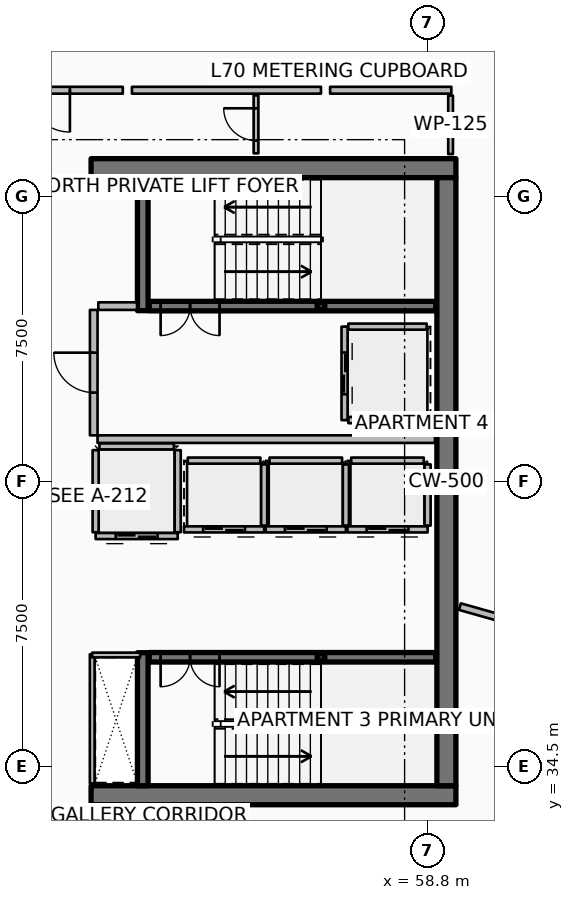
"""IFC4 building model, lengths in metres.
Left out: names, types, materials, properties, quantities, classifications, styles, units other than length and angle.
Written with IfcOpenShell. Run it as: python <this file> out.ifc"""

import sys

from ifc_helpers import new_model, si_unit, direction, frame, frame_2d, origin, origin_2d, place, context, subcontext, project, spatial, rectangle, hollow_rectangle, extrude, element, fill, save


model = new_model("IFC4")
c1 = context("Model", 3, precision=1e-05, world=origin(), true_north=direction((0.0, 1.0)))
c2 = subcontext(c1, "Body", "Model", "MODEL_VIEW")
j1 = project(units=[si_unit("LENGTHUNIT", "METRE"), si_unit("PLANEANGLEUNIT", "RADIAN")], contexts=[c1])
p1 = place(None, origin())
s1 = spatial("IfcSite", under=j1, at=p1, CompositionType="ELEMENT")
p2 = place(p1, origin())
s2 = spatial("IfcBuilding", under=s1, at=p2, CompositionType="ELEMENT")
p3 = place(p2, frame((0.0, 0.0, 279.05)))
s3 = spatial("IfcBuildingStorey", under=s2, at=p3, CompositionType="ELEMENT", Elevation=279.05)
for number, where, z_axis, x_axis in (
    (1, (49.95, 33.75, 0.0), (0.0, 0.0, 1.0), (1.0, 0.0, 0.0)),
    (2, (49.95, 50.25, 0.0), (0.0, 0.0, 1.0), (1.0, 0.0, 0.0)),
):
    element("IfcWall", number, at=place(p3, frame(where, z_axis=z_axis, x_axis=x_axis)), inside=s3, PredefinedType="SHEAR", context=c2, shape_type="SweptSolid", body=[
        extrude(rectangle(XDim=9.6, YDim=0.5, at=frame_2d((4.8, 0.0))), origin(), (0.0, 0.0, 1.0), 3.85),
    ])
p4 = place(p3, frame((59.3, 34.0, 0.0), z_axis=(0.0, 0.0, 1.0), x_axis=(0.0, 1.0, 0.0)))
e3 = element("IfcWall", 3, at=p4, inside=s3, PredefinedType="SHEAR", context=c2, shape_type="SweptSolid", body=[
    extrude(rectangle(XDim=16.0, YDim=0.5, at=frame_2d((8.0, 0.0))), origin(), (0.0, 0.0, 1.0), 3.85),
])
for number, where, z_axis, x_axis in (
    (4, (51.31, 46.5, 0.0), (0.0, 0.0, 1.0), (0.0, 1.0, 0.0)),
    (5, (51.31, 34.0, 0.0), (0.0, 0.0, 1.0), (0.0, 1.0, 0.0)),
):
    element("IfcWall", number, at=place(p3, frame(where, z_axis=z_axis, x_axis=x_axis)), inside=s3, PredefinedType="SHEAR", context=c2, shape_type="SweptSolid", body=[
        extrude(rectangle(XDim=3.5, YDim=0.28, at=frame_2d((1.75, 0.0))), origin(), (0.0, 0.0, 1.0), 3.85),
    ])
for number, where, z_axis, x_axis in (
    (6, (56.0, 46.62, 0.0), (0.0, 0.0, 1.0), (1.0, 0.0, 0.0)),
    (7, (56.0, 37.38, 0.0), (0.0, 0.0, 1.0), (1.0, 0.0, 0.0)),
):
    element("IfcColumn", number, at=place(p3, frame(where, z_axis=z_axis, x_axis=x_axis)), inside=s3, PredefinedType="COLUMN", context=c2, shape_type="SweptSolid", body=[
        extrude(hollow_rectangle(XDim=0.2, YDim=0.2, WallThickness=0.01, InnerFilletRadius=0.01, OuterFilletRadius=0.02, at=origin_2d()), origin(), (0.0, 0.0, 1.0), 1.72),
    ])
p5 = place(p3, frame((51.48, 46.62, 0.0), z_axis=(0.0, 0.0, 1.0), x_axis=(1.0, 0.0, 0.0)))
e8 = element("IfcWall", 8, at=p5, inside=s3, PredefinedType="SOLIDWALL", context=c2, shape_type="SweptSolid", body=[
    extrude(rectangle(XDim=7.54, YDim=0.25, at=frame_2d((3.77, 0.0))), origin(), (0.0, 0.0, 1.0), 3.59),
])
p6 = place(p5, frame((0.3, 0.0, 0.0)))
e9 = element("IfcOpeningElement", 9, at=p6, cuts=e8, PredefinedType="OPENING", context=c2, shape_type="SweptSolid", body=[
    extrude(rectangle(XDim=1.55, YDim=2.15, at=frame_2d((0.775, 1.075))), frame((0.0, 0.135, 0.0), z_axis=(0.0, -1.0, 0.0), x_axis=(1.0, 0.0, 0.0)), (0.0, 0.0, 1.0), 0.27),
])
p7 = place(p3, frame((51.48, 37.38, 0.0), z_axis=(0.0, 0.0, 1.0), x_axis=(1.0, 0.0, 0.0)))
e10 = element("IfcWall", 10, at=p7, inside=s3, PredefinedType="SOLIDWALL", context=c2, shape_type="SweptSolid", body=[
    extrude(rectangle(XDim=7.54, YDim=0.25, at=frame_2d((3.77, 0.0))), origin(), (0.0, 0.0, 1.0), 3.59),
])
p8 = place(p7, frame((0.3, 0.0, 0.0)))
e11 = element("IfcOpeningElement", 11, at=p8, cuts=e10, PredefinedType="OPENING", context=c2, shape_type="SweptSolid", body=[
    extrude(rectangle(XDim=1.55, YDim=2.15, at=frame_2d((0.775, 1.075))), frame((0.0, 0.135, 0.0), z_axis=(0.0, -1.0, 0.0), x_axis=(1.0, 0.0, 0.0)), (0.0, 0.0, 1.0), 0.27),
])
p9 = place(p3, frame((54.505, 40.745, 0.0), z_axis=(0.0, 0.0, 1.0), x_axis=(-1.0, 0.0, 0.0)))
e12 = element("IfcWall", 12, at=p9, inside=s3, PredefinedType="PARTITIONING", context=c2, shape_type="SweptSolid", body=[
    extrude(rectangle(XDim=2.11, YDim=0.16, at=frame_2d((1.055, 0.0))), origin(), (0.0, 0.0, 1.0), 3.59),
])
p10 = place(p9, frame((0.505, 0.0, 0.0)))
e13 = element("IfcOpeningElement", 13, at=p10, cuts=e12, PredefinedType="OPENING", context=c2, shape_type="SweptSolid", body=[
    extrude(rectangle(XDim=1.1, YDim=2.1, at=frame_2d((0.55, 1.05))), frame((0.0, 0.09, 0.0), z_axis=(0.0, -1.0, 0.0), x_axis=(1.0, 0.0, 0.0)), (0.0, 0.0, 1.0), 0.18),
])
p11 = place(p3, frame((54.505, 40.845, 0.0), z_axis=(0.0, 0.0, 1.0), x_axis=(0.0, 1.0, 0.0)))
e14 = element("IfcWall", 14, at=p11, inside=s3, PredefinedType="PARTITIONING", context=c2, shape_type="SweptSolid", body=[
    extrude(rectangle(XDim=1.61, YDim=0.16, at=frame_2d((0.805, 0.0))), origin(), (0.0, 0.0, 1.0), 3.59),
])
p12 = place(p3, frame((52.495, 42.555, 0.0), z_axis=(0.0, 0.0, 1.0), x_axis=(1.0, 0.0, 0.0)))
e15 = element("IfcWall", 15, at=p12, inside=s3, PredefinedType="PARTITIONING", context=c2, shape_type="SweptSolid", body=[
    extrude(rectangle(XDim=1.91, YDim=0.16, at=frame_2d((0.955, 0.0))), origin(), (0.0, 0.0, 1.0), 3.59),
])
p13 = place(p3, frame((56.655, 40.745, 0.0), z_axis=(0.0, 0.0, 1.0), x_axis=(-1.0, 0.0, 0.0)))
e16 = element("IfcWall", 16, at=p13, inside=s3, PredefinedType="PARTITIONING", context=c2, shape_type="SweptSolid", body=[
    extrude(rectangle(XDim=2.11, YDim=0.16, at=frame_2d((1.055, 0.0))), origin(), (0.0, 0.0, 1.0), 3.59),
])
p14 = place(p13, frame((0.505, 0.0, 0.0)))
e17 = element("IfcOpeningElement", 17, at=p14, cuts=e16, PredefinedType="OPENING", context=c2, shape_type="SweptSolid", body=[
    extrude(rectangle(XDim=1.1, YDim=2.1, at=frame_2d((0.55, 1.05))), frame((0.0, 0.09, 0.0), z_axis=(0.0, -1.0, 0.0), x_axis=(1.0, 0.0, 0.0)), (0.0, 0.0, 1.0), 0.18),
])
p15 = place(p3, frame((56.655, 40.845, 0.0), z_axis=(0.0, 0.0, 1.0), x_axis=(0.0, 1.0, 0.0)))
e18 = element("IfcWall", 18, at=p15, inside=s3, PredefinedType="PARTITIONING", context=c2, shape_type="SweptSolid", body=[
    extrude(rectangle(XDim=1.61, YDim=0.16, at=frame_2d((0.805, 0.0))), origin(), (0.0, 0.0, 1.0), 3.59),
])
p16 = place(p3, frame((54.645, 42.555, 0.0), z_axis=(0.0, 0.0, 1.0), x_axis=(1.0, 0.0, 0.0)))
e19 = element("IfcWall", 19, at=p16, inside=s3, PredefinedType="PARTITIONING", context=c2, shape_type="SweptSolid", body=[
    extrude(rectangle(XDim=1.91, YDim=0.16, at=frame_2d((0.955, 0.0))), origin(), (0.0, 0.0, 1.0), 3.59),
])
p17 = place(p3, frame((58.805, 40.745, 0.0), z_axis=(0.0, 0.0, 1.0), x_axis=(-1.0, 0.0, 0.0)))
e20 = element("IfcWall", 20, at=p17, inside=s3, PredefinedType="PARTITIONING", context=c2, shape_type="SweptSolid", body=[
    extrude(rectangle(XDim=2.11, YDim=0.16, at=frame_2d((1.055, 0.0))), origin(), (0.0, 0.0, 1.0), 3.59),
])
p18 = place(p17, frame((0.505, 0.0, 0.0)))
e21 = element("IfcOpeningElement", 21, at=p18, cuts=e20, PredefinedType="OPENING", context=c2, shape_type="SweptSolid", body=[
    extrude(rectangle(XDim=1.1, YDim=2.1, at=frame_2d((0.55, 1.05))), frame((0.0, 0.09, 0.0), z_axis=(0.0, -1.0, 0.0), x_axis=(1.0, 0.0, 0.0)), (0.0, 0.0, 1.0), 0.18),
])
p19 = place(p3, frame((58.805, 40.845, 0.0), z_axis=(0.0, 0.0, 1.0), x_axis=(0.0, 1.0, 0.0)))
e22 = element("IfcWall", 22, at=p19, inside=s3, PredefinedType="PARTITIONING", context=c2, shape_type="SweptSolid", body=[
    extrude(rectangle(XDim=1.61, YDim=0.16, at=frame_2d((0.805, 0.0))), origin(), (0.0, 0.0, 1.0), 3.59),
])
p20 = place(p3, frame((56.795, 42.555, 0.0), z_axis=(0.0, 0.0, 1.0), x_axis=(1.0, 0.0, 0.0)))
e23 = element("IfcWall", 23, at=p20, inside=s3, PredefinedType="PARTITIONING", context=c2, shape_type="SweptSolid", body=[
    extrude(rectangle(XDim=1.91, YDim=0.16, at=frame_2d((0.955, 0.0))), origin(), (0.0, 0.0, 1.0), 3.59),
])
p21 = place(p3, frame((56.62, 46.08, 0.0), z_axis=(0.0, 0.0, 1.0), x_axis=(0.0, -1.0, 0.0)))
e24 = element("IfcWall", 24, at=p21, inside=s3, PredefinedType="PARTITIONING", context=c2, shape_type="SweptSolid", body=[
    extrude(rectangle(XDim=2.46, YDim=0.16, at=frame_2d((1.23, 0.0))), origin(), (0.0, 0.0, 1.0), 3.59),
])
p22 = place(p21, frame((0.68, 0.0, 0.0)))
e25 = element("IfcOpeningElement", 25, at=p22, cuts=e24, PredefinedType="OPENING", context=c2, shape_type="SweptSolid", body=[
    extrude(rectangle(XDim=1.1, YDim=2.1, at=frame_2d((0.55, 1.05))), frame((0.0, 0.09, 0.0), z_axis=(0.0, -1.0, 0.0), x_axis=(1.0, 0.0, 0.0)), (0.0, 0.0, 1.0), 0.18),
])
for number, where, z_axis, x_axis in (
    (26, (56.72, 46.08, 0.0), (0.0, 0.0, 1.0), (1.0, 0.0, 0.0)),
    (27, (56.72, 43.62, 0.0), (0.0, 0.0, 1.0), (1.0, 0.0, 0.0)),
):
    element("IfcWall", number, at=place(p3, frame(where, z_axis=z_axis, x_axis=x_axis)), inside=s3, PredefinedType="PARTITIONING", context=c2, shape_type="SweptSolid", body=[
        extrude(rectangle(XDim=2.06, YDim=0.16, at=frame_2d((1.03, 0.0))), origin(), (0.0, 0.0, 1.0), 3.59),
    ])
p23 = place(p3, frame((52.23, 40.57, 0.0), z_axis=(0.0, 0.0, 1.0), x_axis=(-1.0, 0.0, 0.0)))
e28 = element("IfcWall", 28, at=p23, inside=s3, PredefinedType="PARTITIONING", context=c2, shape_type="SweptSolid", body=[
    extrude(rectangle(XDim=2.16, YDim=0.16, at=frame_2d((1.08, 0.0))), origin(), (0.0, 0.0, 1.0), 3.59),
])
p24 = place(p23, frame((0.53, 0.0, 0.0)))
e29 = element("IfcOpeningElement", 29, at=p24, cuts=e28, PredefinedType="OPENING", context=c2, shape_type="SweptSolid", body=[
    extrude(rectangle(XDim=1.1, YDim=2.1, at=frame_2d((0.55, 1.05))), frame((0.0, 0.09, 0.0), z_axis=(0.0, -1.0, 0.0), x_axis=(1.0, 0.0, 0.0)), (0.0, 0.0, 1.0), 0.18),
])
for number, where, z_axis, x_axis in (
    (30, (52.23, 40.67, 0.0), (0.0, 0.0, 1.0), (0.0, 1.0, 0.0)),
    (31, (50.07, 40.67, 0.0), (0.0, 0.0, 1.0), (0.0, 1.0, 0.0)),
):
    element("IfcWall", number, at=place(p3, frame(where, z_axis=z_axis, x_axis=x_axis)), inside=s3, PredefinedType="PARTITIONING", context=c2, shape_type="SweptSolid", body=[
        extrude(rectangle(XDim=2.16, YDim=0.16, at=frame_2d((1.08, 0.0))), origin(), (0.0, 0.0, 1.0), 3.59),
    ])
p25 = place(p3, frame((50.17, 42.93, 0.0), z_axis=(0.0, 0.0, 1.0), x_axis=(1.0, 0.0, 0.0)))
e32 = element("IfcWall", 32, at=p25, inside=s3, PredefinedType="PARTITIONING", context=c2, shape_type="SweptSolid", body=[
    extrude(rectangle(XDim=1.96, YDim=0.16, at=frame_2d((0.98, 0.0))), origin(), (0.0, 0.0, 1.0), 3.59),
])
p26 = place(p3, frame((50.12, 43.12, 0.0), z_axis=(0.0, 0.0, 1.0), x_axis=(1.0, 0.0, 0.0)))
e33 = element("IfcWall", 33, at=p26, inside=s3, PredefinedType="PARTITIONING", context=c2, shape_type="SweptSolid", body=[
    extrude(rectangle(XDim=8.88, YDim=0.2, at=frame_2d((4.44, 0.0))), origin(), (0.0, 0.0, 1.0), 3.59),
])
p27 = place(p3, frame((50.14, 46.62, 0.0), z_axis=(0.0, 0.0, 1.0), x_axis=(1.0, 0.0, 0.0)))
e34 = element("IfcWall", 34, at=p27, inside=s3, PredefinedType="PARTITIONING", context=c2, shape_type="SweptSolid", body=[
    extrude(rectangle(XDim=1.02, YDim=0.2, at=frame_2d((0.51, 0.0))), origin(), (0.0, 0.0, 1.0), 3.59),
])
p28 = place(p3, frame((50.02, 43.22, 0.0), z_axis=(0.0, 0.0, 1.0), x_axis=(0.0, 1.0, 0.0)))
e35 = element("IfcWall", 35, at=p28, inside=s3, PredefinedType="PARTITIONING", context=c2, shape_type="SweptSolid", body=[
    extrude(rectangle(XDim=3.3, YDim=0.2, at=frame_2d((1.65, 0.0))), origin(), (0.0, 0.0, 1.0), 3.59),
])
p29 = place(p28, frame((1.125, 0.0, 0.0)))
e36 = element("IfcOpeningElement", 36, at=p29, cuts=e35, PredefinedType="OPENING", context=c2, shape_type="SweptSolid", body=[
    extrude(rectangle(XDim=1.05, YDim=2.1, at=frame_2d((0.525, 1.05))), frame((0.0, 0.11, 0.0), z_axis=(0.0, -1.0, 0.0), x_axis=(1.0, 0.0, 0.0)), (0.0, 0.0, 1.0), 0.22),
])
p30 = place(p3, frame((49.98, 34.06, 0.0), z_axis=(0.0, 0.0, 1.0), x_axis=(0.0, 1.0, 0.0)))
e37 = element("IfcWall", 37, at=p30, inside=s3, PredefinedType="PARTITIONING", context=c2, shape_type="SweptSolid", body=[
    extrude(rectangle(XDim=3.4, YDim=0.125, at=frame_2d((1.7, 0.0))), origin(), (0.0, 0.0, 1.0), 3.03),
])
p31 = place(p3, frame((49.98, 37.44, 0.0), z_axis=(0.0, 0.0, 1.0), x_axis=(1.0, 0.0, 0.0)))
e38 = element("IfcWall", 38, at=p31, inside=s3, PredefinedType="PARTITIONING", context=c2, shape_type="SweptSolid", body=[
    extrude(rectangle(XDim=1.26, YDim=0.125, at=frame_2d((0.63, 0.0))), origin(), (0.0, 0.0, 1.0), 3.03),
])
p32 = place(p3, frame((59.41, 50.62, 0.0), z_axis=(0.0, 0.0, 1.0), x_axis=(0.0, 1.0, 0.0)))
e39 = element("IfcWall", 39, at=p32, inside=s3, PredefinedType="PARTITIONING", context=c2, shape_type="SweptSolid", body=[
    extrude(rectangle(XDim=1.54, YDim=0.125, at=frame_2d((0.77, 0.0))), origin(), (0.0, 0.0, 1.0), 3.03),
])
p33 = place(p3, frame((54.29, 50.64, 0.0), z_axis=(0.0, 0.0, 1.0), x_axis=(0.0, 1.0, 0.0)))
e40 = element("IfcWall", 40, at=p33, inside=s3, PredefinedType="PARTITIONING", context=c2, shape_type="SweptSolid", body=[
    extrude(rectangle(XDim=1.52, YDim=0.125, at=frame_2d((0.76, 0.0))), origin(), (0.0, 0.0, 1.0), 3.03),
])
p34 = place(p33, frame((0.335, 0.0, 0.0)))
e41 = element("IfcOpeningElement", 41, at=p34, cuts=e40, PredefinedType="OPENING", context=c2, shape_type="SweptSolid", body=[
    extrude(rectangle(XDim=0.85, YDim=2.06, at=frame_2d((0.425, 1.03))), frame((0.0, 0.073, 0.0), z_axis=(0.0, -1.0, 0.0), x_axis=(1.0, 0.0, 0.0)), (0.0, 0.0, 1.0), 0.145),
])
p35 = place(p3, frame((59.656, 38.713, 0.0), z_axis=(0.0, 0.0, 1.0), x_axis=(0.962454756022, -0.27144215334, 0.0)))
e42 = element("IfcWall", 42, at=p35, inside=s3, PredefinedType="PARTITIONING", context=c2, shape_type="SweptSolid", body=[
    extrude(rectangle(XDim=17.385, YDim=0.18, at=frame_2d((8.692, 0.0))), origin(), (0.0, 0.0, 1.0), 2.957),
])
p36 = place(p3, frame((50.785, 52.3, 0.0), z_axis=(0.0, 0.0, 1.0), x_axis=(-1.0, 0.0, 0.0)))
e43 = element("IfcWall", 43, at=p36, inside=s3, PredefinedType="PARTITIONING", context=c2, shape_type="SweptSolid", body=[
    extrude(rectangle(XDim=3.884, YDim=0.18, at=frame_2d((1.942, 0.0))), origin(), (0.0, 0.0, 1.0), 2.957),
])
p37 = place(p36, frame((1.392, 0.0, 0.0)))
e44 = element("IfcOpeningElement", 44, at=p37, cuts=e43, PredefinedType="OPENING", context=c2, shape_type="SweptSolid", body=[
    extrude(rectangle(XDim=1.1, YDim=2.1, at=frame_2d((0.55, 1.05))), frame((0.0, 0.1, 0.0), z_axis=(0.0, -1.0, 0.0), x_axis=(1.0, 0.0, 0.0)), (0.0, 0.0, 1.0), 0.2),
])
p38 = place(p3, frame((59.43, 52.3, 0.0), z_axis=(0.0, 0.0, 1.0), x_axis=(-1.0, 0.0, 0.0)))
e45 = element("IfcWall", 45, at=p38, inside=s3, PredefinedType="PARTITIONING", context=c2, shape_type="SweptSolid", body=[
    extrude(rectangle(XDim=3.19, YDim=0.18, at=frame_2d((1.595, 0.0))), origin(), (0.0, 0.0, 1.0), 2.957),
])
p39 = place(p3, frame((56.0, 52.3, 0.0), z_axis=(0.0, 0.0, 1.0), x_axis=(-1.0, 0.0, 0.0)))
e46 = element("IfcWall", 46, at=p39, inside=s3, PredefinedType="PARTITIONING", context=c2, shape_type="SweptSolid", body=[
    extrude(rectangle(XDim=4.975, YDim=0.18, at=frame_2d((2.488, 0.0))), origin(), (0.0, 0.0, 1.0), 2.957),
])
p40 = place(p6, origin())
e47 = element("IfcDoor", 47, at=p40, inside=s3, OperationType="DOUBLE_DOOR_SINGLE_SWING", PredefinedType="DOOR", context=c2, shape_type="SweptSolid", body=[
    extrude(rectangle(XDim=1.55, YDim=2.15, at=frame_2d((0.775, 1.075))), frame((0.0, 0.025, 0.0), z_axis=(0.0, -1.0, 0.0), x_axis=(1.0, 0.0, 0.0)), (0.0, 0.0, 1.0), 0.05),
])
fill(e9, e47)
p41 = place(p8, origin())
e48 = element("IfcDoor", 48, at=p41, inside=s3, OperationType="DOUBLE_DOOR_SINGLE_SWING", PredefinedType="DOOR", context=c2, shape_type="SweptSolid", body=[
    extrude(rectangle(XDim=1.55, YDim=2.15, at=frame_2d((0.775, 1.075))), frame((0.0, 0.025, 0.0), z_axis=(0.0, -1.0, 0.0), x_axis=(1.0, 0.0, 0.0)), (0.0, 0.0, 1.0), 0.05),
])
fill(e11, e48)
p42 = place(p10, origin())
e49 = element("IfcDoor", 49, at=p42, inside=s3, OperationType="DOUBLE_DOOR_SLIDING", PredefinedType="DOOR", context=c2, shape_type="SweptSolid", body=[
    extrude(rectangle(XDim=1.1, YDim=2.1, at=frame_2d((0.55, 1.05))), frame((0.0, 0.025, 0.0), z_axis=(0.0, -1.0, 0.0), x_axis=(1.0, 0.0, 0.0)), (0.0, 0.0, 1.0), 0.05),
])
fill(e13, e49)
p43 = place(p14, origin())
e50 = element("IfcDoor", 50, at=p43, inside=s3, OperationType="DOUBLE_DOOR_SLIDING", PredefinedType="DOOR", context=c2, shape_type="SweptSolid", body=[
    extrude(rectangle(XDim=1.1, YDim=2.1, at=frame_2d((0.55, 1.05))), frame((0.0, 0.025, 0.0), z_axis=(0.0, -1.0, 0.0), x_axis=(1.0, 0.0, 0.0)), (0.0, 0.0, 1.0), 0.05),
])
fill(e17, e50)
p44 = place(p18, origin())
e51 = element("IfcDoor", 51, at=p44, inside=s3, OperationType="DOUBLE_DOOR_SLIDING", PredefinedType="DOOR", context=c2, shape_type="SweptSolid", body=[
    extrude(rectangle(XDim=1.1, YDim=2.1, at=frame_2d((0.55, 1.05))), frame((0.0, 0.025, 0.0), z_axis=(0.0, -1.0, 0.0), x_axis=(1.0, 0.0, 0.0)), (0.0, 0.0, 1.0), 0.05),
])
fill(e21, e51)
p45 = place(p22, origin())
e52 = element("IfcDoor", 52, at=p45, inside=s3, OperationType="DOUBLE_DOOR_SLIDING", PredefinedType="DOOR", context=c2, shape_type="SweptSolid", body=[
    extrude(rectangle(XDim=1.1, YDim=2.1, at=frame_2d((0.55, 1.05))), frame((0.0, 0.025, 0.0), z_axis=(0.0, -1.0, 0.0), x_axis=(1.0, 0.0, 0.0)), (0.0, 0.0, 1.0), 0.05),
])
fill(e25, e52)
p46 = place(p24, origin())
e53 = element("IfcDoor", 53, at=p46, inside=s3, OperationType="DOUBLE_DOOR_SLIDING", PredefinedType="DOOR", context=c2, shape_type="SweptSolid", body=[
    extrude(rectangle(XDim=1.1, YDim=2.1, at=frame_2d((0.55, 1.05))), frame((0.0, 0.025, 0.0), z_axis=(0.0, -1.0, 0.0), x_axis=(1.0, 0.0, 0.0)), (0.0, 0.0, 1.0), 0.05),
])
fill(e29, e53)
p47 = place(p29, origin())
e54 = element("IfcDoor", 54, at=p47, inside=s3, OperationType="SINGLE_SWING_RIGHT", PredefinedType="DOOR", context=c2, shape_type="SweptSolid", body=[
    extrude(rectangle(XDim=1.05, YDim=2.1, at=frame_2d((0.525, 1.05))), frame((0.0, 0.025, 0.0), z_axis=(0.0, -1.0, 0.0), x_axis=(1.0, 0.0, 0.0)), (0.0, 0.0, 1.0), 0.05),
])
fill(e36, e54)
p48 = place(p34, origin())
e55 = element("IfcDoor", 55, at=p48, inside=s3, OperationType="SINGLE_SWING_RIGHT", PredefinedType="DOOR", context=c2, shape_type="SweptSolid", body=[
    extrude(rectangle(XDim=0.85, YDim=2.06, at=frame_2d((0.425, 1.03))), frame((0.0, 0.025, 0.0), z_axis=(0.0, -1.0, 0.0), x_axis=(1.0, 0.0, 0.0)), (0.0, 0.0, 1.0), 0.05),
])
fill(e41, e55)
p49 = place(p37, origin())
e56 = element("IfcDoor", 56, at=p49, inside=s3, OperationType="SINGLE_SWING_LEFT", PredefinedType="DOOR", context=c2, shape_type="SweptSolid", body=[
    extrude(rectangle(XDim=1.1, YDim=2.1, at=frame_2d((0.55, 1.05))), frame((0.0, 0.025, 0.0), z_axis=(0.0, -1.0, 0.0), x_axis=(1.0, 0.0, 0.0)), (0.0, 0.0, 1.0), 0.05),
])
fill(e44, e56)
save(model, sys.argv[1])
